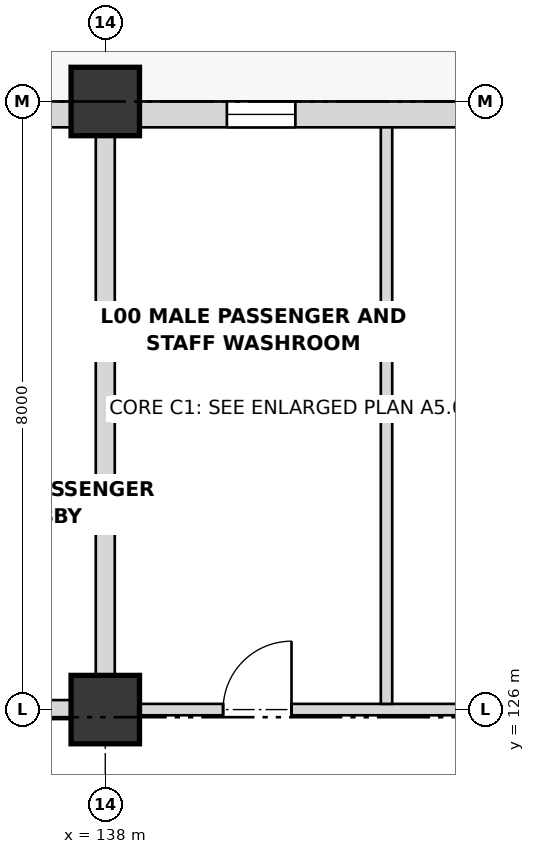
"""IFC4 building model, lengths in metres.
Left out: names, types, materials, properties, quantities, classifications, styles, units other than length and angle.
Written with IfcOpenShell. Run it as: python <this file> out.ifc"""

import sys

from ifc_helpers import new_model, si_unit, direction, frame, frame_2d, origin, origin_2d, place, context, subcontext, project, spatial, rectangle, extrude, element, fill, save


model = new_model("IFC4")
c1 = context("Model", 3, precision=1e-05, world=origin(), true_north=direction((0.0, 1.0)))
c2 = subcontext(c1, "Body", "Model", "MODEL_VIEW")
j1 = project(units=[si_unit("LENGTHUNIT", "METRE"), si_unit("PLANEANGLEUNIT", "RADIAN")], contexts=[c1])
p1 = place(None, origin())
s1 = spatial("IfcSite", under=j1, at=p1, CompositionType="ELEMENT")
p2 = place(p1, origin())
s2 = spatial("IfcBuilding", under=s1, at=p2, CompositionType="ELEMENT")
p3 = place(p2, origin())
s3 = spatial("IfcBuildingStorey", under=s2, at=p3, CompositionType="ELEMENT", Elevation=0.0)
for number, where, z_axis, x_axis in (
    (1, (138.0, 126.0, 0.0), (0.0, 0.0, 1.0), (1.0, 0.0, 0.0)),
    (2, (138.0, 134.0, 0.0), (0.0, 0.0, 1.0), (1.0, 0.0, 0.0)),
):
    element("IfcColumn", number, at=place(p3, frame(where, z_axis=z_axis, x_axis=x_axis)), inside=s3, PredefinedType="COLUMN", context=c2, shape_type="SweptSolid", body=[
        extrude(rectangle(XDim=0.9, YDim=0.9, at=origin_2d()), origin(), (0.0, 0.0, 1.0), 5.4),
    ])
p4 = place(p3, frame((128.445, 133.83, 0.0), z_axis=(0.0, 0.0, 1.0), x_axis=(1.0, 0.0, 0.0)))
e3 = element("IfcWall", 3, at=p4, inside=s3, PredefinedType="SOLIDWALL", context=c2, shape_type="SweptSolid", body=[
    extrude(rectangle(XDim=9.11, YDim=0.34, at=frame_2d((4.555, 0.0))), origin(), (0.0, 0.0, 1.0), 4.358),
])
p5 = place(p4, frame((6.005, 0.0, 0.0)))
e4 = element("IfcOpeningElement", 4, at=p5, cuts=e3, PredefinedType="OPENING", context=c2, shape_type="SweptSolid", body=[
    extrude(rectangle(XDim=1.5, YDim=2.25, at=frame_2d((0.75, 1.125))), frame((0.0, 0.18, 0.0), z_axis=(0.0, -1.0, 0.0), x_axis=(1.0, 0.0, 0.0)), (0.0, 0.0, 1.0), 0.36),
])
p6 = place(p3, frame((138.445, 133.83, 0.0), z_axis=(0.0, 0.0, 1.0), x_axis=(1.0, 0.0, 0.0)))
e5 = element("IfcWall", 5, at=p6, inside=s3, PredefinedType="SOLIDWALL", context=c2, shape_type="SweptSolid", body=[
    extrude(rectangle(XDim=9.11, YDim=0.34, at=frame_2d((4.555, 0.0))), origin(), (0.0, 0.0, 1.0), 4.358),
])
p7 = place(p6, frame((1.155, 0.0, 1.85)))
e6 = element("IfcOpeningElement", 6, at=p7, cuts=e5, PredefinedType="OPENING", context=c2, shape_type="SweptSolid", body=[
    extrude(rectangle(XDim=0.9, YDim=1.15, at=frame_2d((0.45, 0.575))), frame((0.0, 0.18, 0.0), z_axis=(0.0, -1.0, 0.0), x_axis=(1.0, 0.0, 0.0)), (0.0, 0.0, 1.0), 0.36),
])
p8 = place(p6, frame((4.455, 0.0, 1.85)))
e7 = element("IfcOpeningElement", 7, at=p8, cuts=e5, PredefinedType="OPENING", context=c2, shape_type="SweptSolid", body=[
    extrude(rectangle(XDim=1.1, YDim=1.15, at=frame_2d((0.55, 0.575))), frame((0.0, 0.18, 0.0), z_axis=(0.0, -1.0, 0.0), x_axis=(1.0, 0.0, 0.0)), (0.0, 0.0, 1.0), 0.36),
])
p9 = place(p6, frame((7.555, 0.0, 1.85)))
e8 = element("IfcOpeningElement", 8, at=p9, cuts=e5, PredefinedType="OPENING", context=c2, shape_type="SweptSolid", body=[
    extrude(rectangle(XDim=0.9, YDim=1.15, at=frame_2d((0.45, 0.575))), frame((0.0, 0.18, 0.0), z_axis=(0.0, -1.0, 0.0), x_axis=(1.0, 0.0, 0.0)), (0.0, 0.0, 1.0), 0.36),
])
p10 = place(p3, frame((128.455, 126.0, 0.0), z_axis=(0.0, 0.0, 1.0), x_axis=(1.0, 0.0, 0.0)))
e9 = element("IfcWall", 9, at=p10, inside=s3, PredefinedType="PARTITIONING", context=c2, shape_type="SweptSolid", body=[
    extrude(rectangle(XDim=9.09, YDim=0.25, at=frame_2d((4.545, 0.0))), origin(), (0.0, 0.0, 1.0), 4.258),
])
p11 = place(p10, frame((1.72, 0.0, 0.0)))
e10 = element("IfcOpeningElement", 10, at=p11, cuts=e9, PredefinedType="OPENING", context=c2, shape_type="SweptSolid", body=[
    extrude(rectangle(XDim=1.25, YDim=2.15, at=frame_2d((0.625, 1.075))), frame((0.0, 0.135, 0.0), z_axis=(0.0, -1.0, 0.0), x_axis=(1.0, 0.0, 0.0)), (0.0, 0.0, 1.0), 0.27),
])
p12 = place(p10, frame((6.195, 0.0, 0.0)))
e11 = element("IfcOpeningElement", 11, at=p12, cuts=e9, PredefinedType="OPENING", context=c2, shape_type="SweptSolid", body=[
    extrude(rectangle(XDim=1.1, YDim=2.15, at=frame_2d((0.55, 1.075))), frame((0.0, 0.135, 0.0), z_axis=(0.0, -1.0, 0.0), x_axis=(1.0, 0.0, 0.0)), (0.0, 0.0, 1.0), 0.27),
])
p13 = place(p3, frame((138.455, 126.0, 0.0), z_axis=(0.0, 0.0, 1.0), x_axis=(1.0, 0.0, 0.0)))
e12 = element("IfcWall", 12, at=p13, inside=s3, PredefinedType="PARTITIONING", context=c2, shape_type="SweptSolid", body=[
    extrude(rectangle(XDim=9.09, YDim=0.15, at=frame_2d((4.545, 0.0))), origin(), (0.0, 0.0, 1.0), 4.258),
])
p14 = place(p13, frame((1.095, 0.0, 0.0)))
e13 = element("IfcOpeningElement", 13, at=p14, cuts=e12, PredefinedType="OPENING", context=c2, shape_type="SweptSolid", body=[
    extrude(rectangle(XDim=0.9, YDim=2.05, at=frame_2d((0.45, 1.025))), frame((0.0, 0.085, 0.0), z_axis=(0.0, -1.0, 0.0), x_axis=(1.0, 0.0, 0.0)), (0.0, 0.0, 1.0), 0.17),
])
p15 = place(p13, frame((4.47, 0.0, 0.0)))
e14 = element("IfcOpeningElement", 14, at=p15, cuts=e12, PredefinedType="OPENING", context=c2, shape_type="SweptSolid", body=[
    extrude(rectangle(XDim=0.95, YDim=2.05, at=frame_2d((0.475, 1.025))), frame((0.0, 0.085, 0.0), z_axis=(0.0, -1.0, 0.0), x_axis=(1.0, 0.0, 0.0)), (0.0, 0.0, 1.0), 0.17),
])
p16 = place(p13, frame((7.445, 0.0, 0.0)))
e15 = element("IfcOpeningElement", 15, at=p16, cuts=e12, PredefinedType="OPENING", context=c2, shape_type="SweptSolid", body=[
    extrude(rectangle(XDim=1.0, YDim=2.05, at=frame_2d((0.5, 1.025))), frame((0.0, 0.085, 0.0), z_axis=(0.0, -1.0, 0.0), x_axis=(1.0, 0.0, 0.0)), (0.0, 0.0, 1.0), 0.17),
])
p17 = place(p3, frame((141.7, 126.075, 0.0), z_axis=(0.0, 0.0, 1.0), x_axis=(0.0, 1.0, 0.0)))
e16 = element("IfcWall", 16, at=p17, inside=s3, PredefinedType="PARTITIONING", context=c2, shape_type="SweptSolid", body=[
    extrude(rectangle(XDim=7.585, YDim=0.15, at=frame_2d((3.792, 0.0))), origin(), (0.0, 0.0, 1.0), 4.258),
])
p18 = place(p3, frame((138.0, 126.455, 0.0), z_axis=(0.0, 0.0, 1.0), x_axis=(0.0, 1.0, 0.0)))
e17 = element("IfcWall", 17, at=p18, inside=s3, PredefinedType="PARTITIONING", context=c2, shape_type="SweptSolid", body=[
    extrude(rectangle(XDim=7.09, YDim=0.25, at=frame_2d((3.545, 0.0))), origin(), (0.0, 0.0, 1.0), 4.358),
])
p19 = place(p7, origin())
e18 = element("IfcWindow", 18, at=p19, inside=s3, PartitioningType="SINGLE_PANEL", PredefinedType="WINDOW", context=c2, shape_type="SweptSolid", body=[
    extrude(rectangle(XDim=0.9, YDim=1.15, at=frame_2d((0.45, 0.575))), frame((0.0, 0.03, 0.0), z_axis=(0.0, -1.0, 0.0), x_axis=(1.0, 0.0, 0.0)), (0.0, 0.0, 1.0), 0.06),
])
fill(e6, e18)
p20 = place(p14, origin())
e19 = element("IfcDoor", 19, at=p20, inside=s3, OperationType="SINGLE_SWING_RIGHT", PredefinedType="DOOR", context=c2, shape_type="SweptSolid", body=[
    extrude(rectangle(XDim=0.9, YDim=2.05, at=frame_2d((0.45, 1.025))), frame((0.0, 0.025, 0.0), z_axis=(0.0, -1.0, 0.0), x_axis=(1.0, 0.0, 0.0)), (0.0, 0.0, 1.0), 0.05),
])
fill(e13, e19)
save(model, sys.argv[1])
